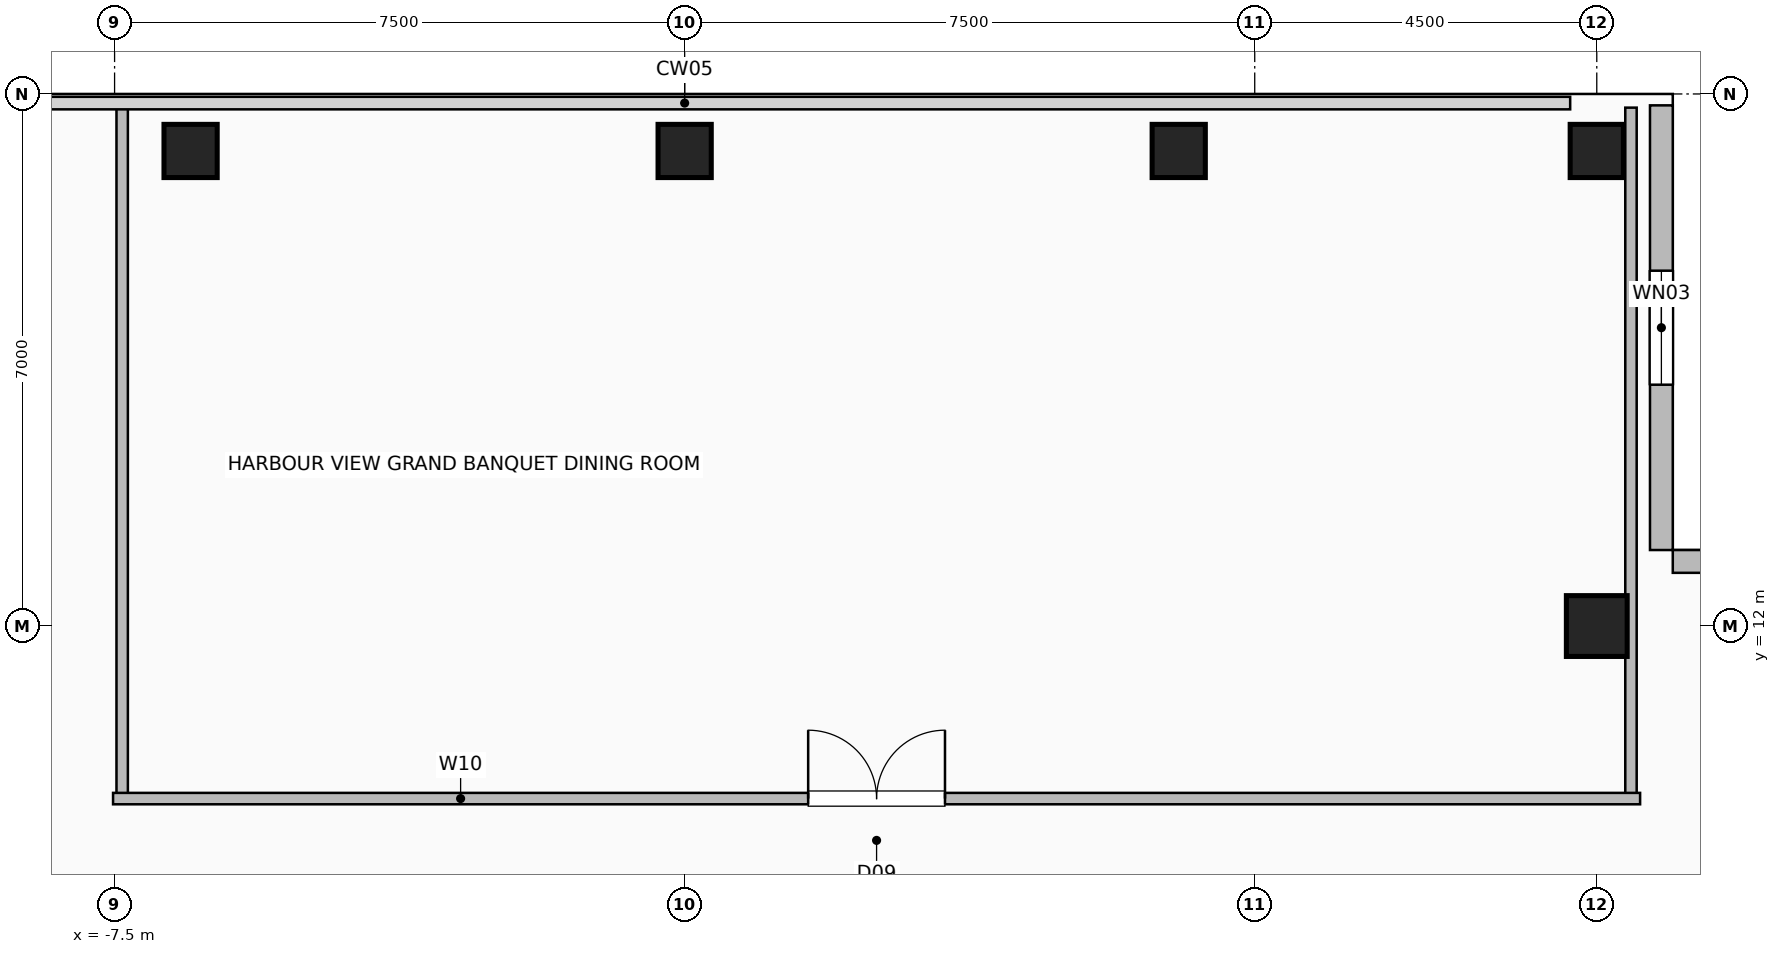
"""IFC4 building model, lengths in metres.
Left out: names, types, materials, properties, quantities, classifications, styles, units other than length and angle.
Written with IfcOpenShell. Run it as: python <this file> out.ifc"""

import sys

from ifc_helpers import new_model, si_unit, direction, frame, frame_2d, origin, origin_2d, place, context, subcontext, project, spatial, rectangle, hollow_rectangle, extrude, element, fill, save


model = new_model("IFC4")
c1 = context("Model", 3, precision=1e-05, world=origin(), true_north=direction((0.0, 1.0)))
c2 = subcontext(c1, "Body", "Model", "MODEL_VIEW")
j1 = project(units=[si_unit("LENGTHUNIT", "METRE"), si_unit("PLANEANGLEUNIT", "RADIAN")], contexts=[c1])
p1 = place(None, origin())
s1 = spatial("IfcSite", under=j1, at=p1, CompositionType="ELEMENT")
p2 = place(p1, origin())
s2 = spatial("IfcBuilding", under=s1, at=p2, CompositionType="ELEMENT")
p3 = place(p2, frame((0.0, 0.0, 297.2)))
s3 = spatial("IfcBuildingStorey", under=s2, at=p3, CompositionType="ELEMENT", Elevation=297.2)
for number, where, z_axis, x_axis in (
    (1, (-6.5, 18.25, 0.0), (0.0, 0.0, 1.0), (1.0, 0.0, 0.0)),
    (2, (0.0, 18.25, 0.0), (0.0, 0.0, 1.0), (1.0, 0.0, 0.0)),
    (3, (6.5, 18.25, 0.0), (0.0, 0.0, 1.0), (1.0, 0.0, 0.0)),
    (4, (12.0, 18.25, 0.0), (0.0, 0.0, 1.0), (1.0, 0.0, 0.0)),
):
    element("IfcColumn", number, at=place(p3, frame(where, z_axis=z_axis, x_axis=x_axis)), inside=s3, PredefinedType="COLUMN", context=c2, shape_type="SweptSolid", body=[
        extrude(hollow_rectangle(XDim=0.7, YDim=0.7, WallThickness=0.035, at=origin_2d()), origin(), (0.0, 0.0, 1.0), 3.2),
    ])
p4 = place(p3, frame((12.0, 12.0, 0.0), z_axis=(0.0, 0.0, 1.0), x_axis=(1.0, 0.0, 0.0)))
e5 = element("IfcColumn", 5, at=p4, inside=s3, PredefinedType="COLUMN", context=c2, shape_type="SweptSolid", body=[
    extrude(hollow_rectangle(XDim=0.8, YDim=0.8, WallThickness=0.04, at=origin_2d()), origin(), (0.0, 0.0, 1.0), 3.2),
])
p5 = place(p3, frame((12.85, 18.85, 0.0), z_axis=(0.0, 0.0, 1.0), x_axis=(0.0, -1.0, 0.0)))
e6 = element("IfcWall", 6, at=p5, inside=s3, PredefinedType="SOLIDWALL", context=c2, shape_type="SweptSolid", body=[
    extrude(rectangle(XDim=5.85, YDim=0.3, at=frame_2d((2.925, 0.0))), origin(), (0.0, 0.0, 1.0), 3.2),
])
p6 = place(p5, frame((2.175, 0.0, 0.9)))
e7 = element("IfcOpeningElement", 7, at=p6, cuts=e6, PredefinedType="OPENING", context=c2, shape_type="SweptSolid", body=[
    extrude(rectangle(XDim=1.5, YDim=1.8, at=frame_2d((0.75, 0.9))), frame((0.0, 0.16, 0.0), z_axis=(0.0, -1.0, 0.0), x_axis=(1.0, 0.0, 0.0)), (0.0, 0.0, 1.0), 0.32),
])
p7 = place(p3, frame((18.85, 12.85, 0.0), z_axis=(0.0, 0.0, 1.0), x_axis=(-1.0, 0.0, 0.0)))
e8 = element("IfcWall", 8, at=p7, inside=s3, PredefinedType="SOLIDWALL", context=c2, shape_type="SweptSolid", body=[
    extrude(rectangle(XDim=5.85, YDim=0.3, at=frame_2d((2.925, 0.0))), origin(), (0.0, 0.0, 1.0), 3.2),
])
p8 = place(p3, frame((-7.4, 9.73, 0.0), z_axis=(0.0, 0.0, 1.0), x_axis=(0.0, 1.0, 0.0)))
e9 = element("IfcWall", 9, at=p8, inside=s3, PredefinedType="PARTITIONING", context=c2, shape_type="SweptSolid", body=[
    extrude(rectangle(XDim=9.09, YDim=0.15, at=frame_2d((4.545, 0.0))), origin(), (0.0, 0.0, 1.0), 2.075),
])
p9 = place(p3, frame((12.45, 9.73, 0.0), z_axis=(0.0, 0.0, 1.0), x_axis=(0.0, 1.0, 0.0)))
e10 = element("IfcWall", 10, at=p9, inside=s3, PredefinedType="PARTITIONING", context=c2, shape_type="SweptSolid", body=[
    extrude(rectangle(XDim=9.09, YDim=0.15, at=frame_2d((4.545, 0.0))), origin(), (0.0, 0.0, 1.0), 3.2),
])
p10 = place(p3, frame((-7.52, 9.73, 0.0), z_axis=(0.0, 0.0, 1.0), x_axis=(1.0, 0.0, 0.0)))
e11 = element("IfcWall", 11, at=p10, inside=s3, PredefinedType="PARTITIONING", context=c2, shape_type="SweptSolid", body=[
    extrude(rectangle(XDim=20.09, YDim=0.15, at=frame_2d((10.045, 0.0))), origin(), (0.0, 0.0, 1.0), 3.2),
])
p11 = place(p10, frame((9.145, 0.0, 0.0)))
e12 = element("IfcOpeningElement", 12, at=p11, cuts=e11, PredefinedType="OPENING", context=c2, shape_type="SweptSolid", body=[
    extrude(rectangle(XDim=1.8, YDim=2.08, at=frame_2d((0.9, 1.04))), frame((0.0, 0.085, 0.0), z_axis=(0.0, -1.0, 0.0), x_axis=(1.0, 0.0, 0.0)), (0.0, 0.0, 1.0), 0.17),
])
p12 = place(p6, origin())
e13 = element("IfcWindow", 13, at=p12, inside=s3, PartitioningType="SINGLE_PANEL", PredefinedType="WINDOW", context=c2, shape_type="SweptSolid", body=[
    extrude(rectangle(XDim=1.5, YDim=1.8, at=frame_2d((0.75, 0.9))), frame((0.0, 0.03, 0.0), z_axis=(0.0, -1.0, 0.0), x_axis=(1.0, 0.0, 0.0)), (0.0, 0.0, 1.0), 0.06),
])
fill(e7, e13)
p13 = place(p11, origin())
e14 = element("IfcDoor", 14, at=p13, inside=s3, OperationType="DOUBLE_DOOR_SINGLE_SWING", PredefinedType="DOOR", context=c2, shape_type="SweptSolid", body=[
    extrude(rectangle(XDim=1.8, YDim=2.08, at=frame_2d((0.9, 1.04))), frame((0.0, 0.025, 0.0), z_axis=(0.0, -1.0, 0.0), x_axis=(1.0, 0.0, 0.0)), (0.0, 0.0, 1.0), 0.05),
])
fill(e12, e14)
save(model, sys.argv[1])
